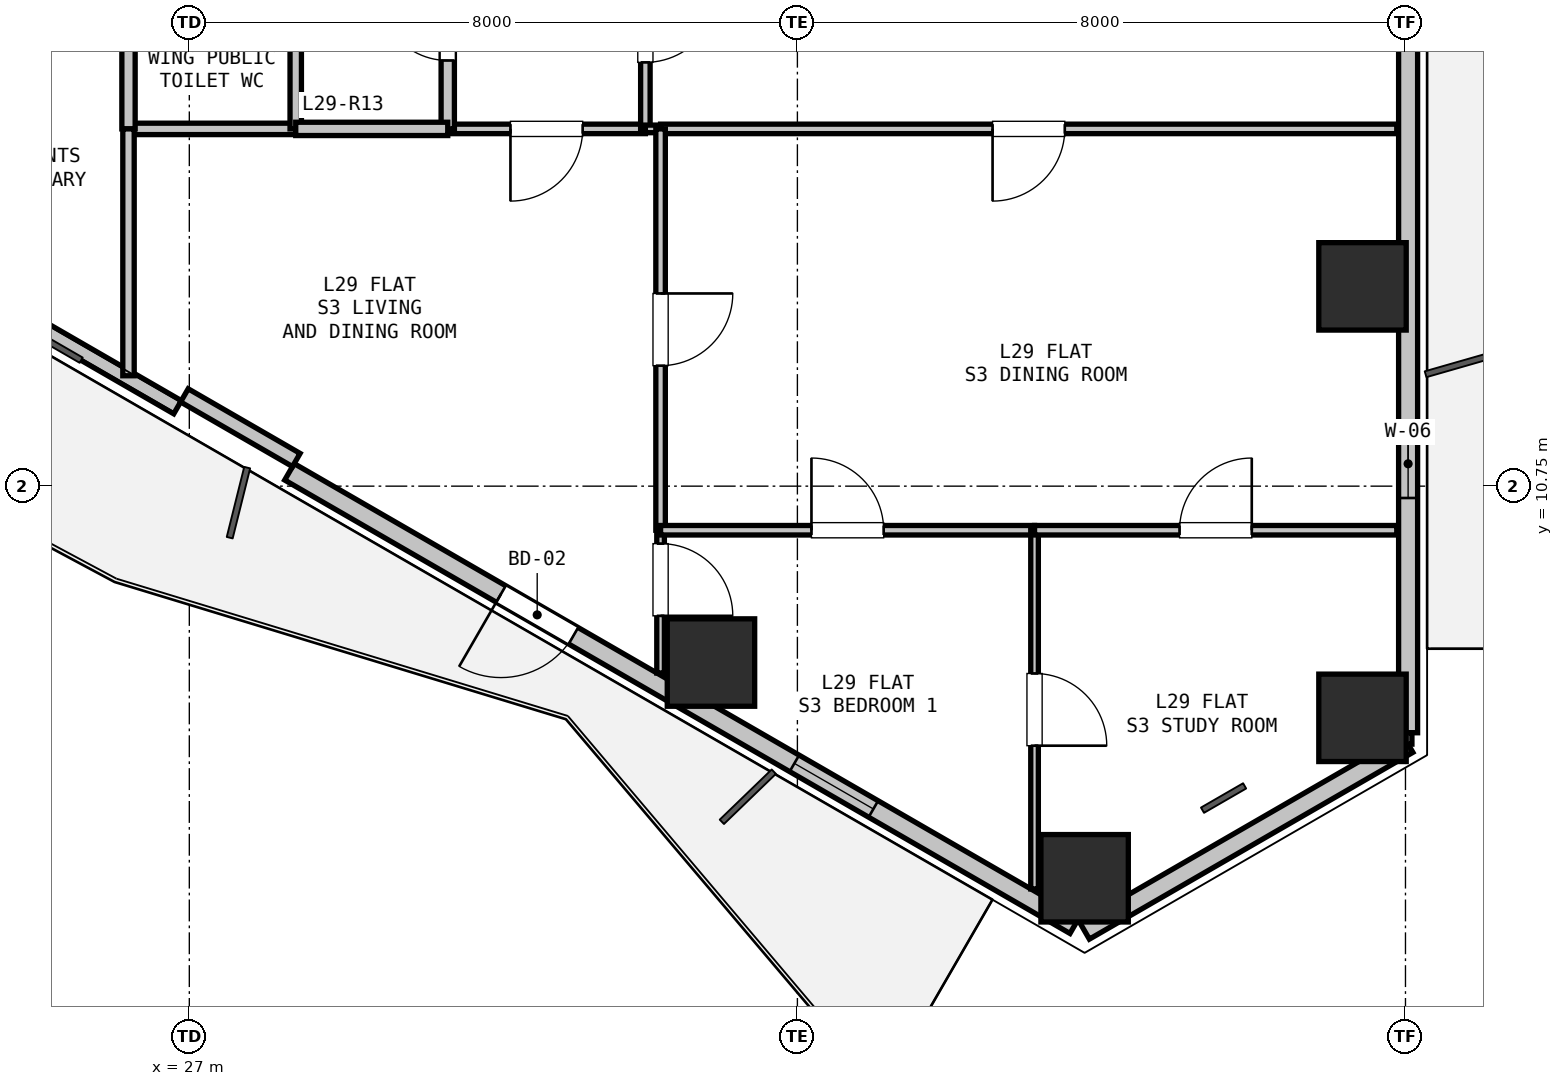
"""IFC4 building model, lengths in metres.
Left out: names, types, materials, properties, quantities, classifications, styles, units other than length and angle.
Written with IfcOpenShell. Run it as: python <this file> out.ifc"""

import sys

from ifc_helpers import new_model, si_unit, direction, frame, frame_2d, origin, origin_2d, place, context, subcontext, project, spatial, rectangle, hollow_rectangle, extrude, element, fill, save


model = new_model("IFC4")
c1 = context("Model", 3, precision=1e-05, world=origin(), true_north=direction((0.0, 1.0)))
c2 = subcontext(c1, "Body", "Model", "MODEL_VIEW")
j1 = project(units=[si_unit("LENGTHUNIT", "METRE"), si_unit("PLANEANGLEUNIT", "RADIAN")], contexts=[c1])
p1 = place(None, origin())
s1 = spatial("IfcSite", under=j1, at=p1, CompositionType="ELEMENT")
p2 = place(p1, origin())
s2 = spatial("IfcBuilding", under=s1, at=p2, CompositionType="ELEMENT")
p3 = place(p2, frame((0.0, 0.0, 106.5)))
s3 = spatial("IfcBuildingStorey", under=s2, at=p3, CompositionType="ELEMENT", Elevation=106.5)
for number, where, z_axis, x_axis in (
    (1, (42.435, 13.378, 0.0), (0.0, 0.0, 1.0), (1.0, 0.0, 0.0)),
    (2, (42.435, 7.702, 0.0), (0.0, 0.0, 1.0), (1.0, 0.0, 0.0)),
    (3, (38.779, 5.591, 0.0), (0.0, 0.0, 1.0), (1.0, 0.0, 0.0)),
    (4, (33.863, 8.429, 0.0), (0.0, 0.0, 1.0), (1.0, 0.0, 0.0)),
):
    element("IfcColumn", number, at=place(p3, frame(where, z_axis=z_axis, x_axis=x_axis)), inside=s3, PredefinedType="COLUMN", context=c2, shape_type="SweptSolid", body=[
        extrude(hollow_rectangle(XDim=1.15, YDim=1.15, WallThickness=0.032, at=origin_2d()), origin(), (0.0, 0.0, 1.0), 3.3),
    ])
p4 = place(p3, frame((43.035, 7.356, 0.0), z_axis=(0.0, 0.0, 1.0), x_axis=(-0.866011848704, -0.500023477353, 0.0)))
e5 = element("IfcWall", 5, at=p4, inside=s3, PredefinedType="SOLIDWALL", context=c2, shape_type="SweptSolid", body=[
    extrude(rectangle(XDim=4.914, YDim=0.25, at=frame_2d((2.457, 0.0))), origin(), (0.0, 0.0, 1.0), 2.67),
])
p5 = place(p3, frame((43.035, 19.435, 0.0), z_axis=(0.0, 0.0, 1.0), x_axis=(0.0, -1.0, 0.0)))
e6 = element("IfcWall", 6, at=p5, inside=s3, PredefinedType="SOLIDWALL", context=c2, shape_type="SweptSolid", body=[
    extrude(rectangle(XDim=11.93, YDim=0.25, at=frame_2d((5.965, 0.0))), origin(), (0.0, 0.0, 1.0), 2.67),
])
p6 = place(p5, frame((7.941, 0.0, 0.9)))
e7 = element("IfcOpeningElement", 7, at=p6, cuts=e6, PredefinedType="OPENING", context=c2, shape_type="SweptSolid", body=[
    extrude(rectangle(XDim=0.9, YDim=1.4, at=frame_2d((0.45, 0.7))), frame((0.0, 0.135, 0.0), z_axis=(0.0, -1.0, 0.0), x_axis=(1.0, 0.0, 0.0)), (0.0, 0.0, 1.0), 0.27),
])
p7 = place(p3, frame((38.649, 4.973, 0.0), z_axis=(0.0, 0.0, 1.0), x_axis=(-0.866023023012, 0.500004123596, 0.0)))
e8 = element("IfcWall", 8, at=p7, inside=s3, PredefinedType="SOLIDWALL", context=c2, shape_type="SweptSolid", body=[
    extrude(rectangle(XDim=11.93, YDim=0.25, at=frame_2d((5.965, 0.0))), origin(), (0.0, 0.0, 1.0), 2.67),
])
p8 = place(p7, frame((7.616, 0.0, 0.0)))
e9 = element("IfcOpeningElement", 9, at=p8, cuts=e8, PredefinedType="OPENING", context=c2, shape_type="SweptSolid", body=[
    extrude(rectangle(XDim=1.1, YDim=2.1, at=frame_2d((0.55, 1.05))), frame((0.0, 0.135, 0.0), z_axis=(0.0, -1.0, 0.0), x_axis=(1.0, 0.0, 0.0)), (0.0, 0.0, 1.0), 0.27),
])
p9 = place(p7, frame((3.059, 0.0, 0.9)))
e10 = element("IfcOpeningElement", 10, at=p9, cuts=e8, PredefinedType="OPENING", context=c2, shape_type="SweptSolid", body=[
    extrude(rectangle(XDim=1.2, YDim=1.4, at=frame_2d((0.6, 0.7))), frame((0.0, 0.135, 0.0), z_axis=(0.0, -1.0, 0.0), x_axis=(1.0, 0.0, 0.0)), (0.0, 0.0, 1.0), 0.27),
])
p10 = place(p3, frame((26.845, 11.788, 0.0), z_axis=(0.0, 0.0, 1.0), x_axis=(-0.866027010039, 0.499997217876, 0.0)))
e11 = element("IfcWall", 11, at=p10, inside=s3, PredefinedType="PARAPET", context=c2, shape_type="SweptSolid", body=[
    extrude(rectangle(XDim=11.229, YDim=0.2, at=frame_2d((5.615, 0.0))), origin(), (0.0, 0.0, 1.0), 0.2),
])
p11 = place(p3, frame((28.407, 11.094, 0.0), z_axis=(0.0, 0.0, 1.0), x_axis=(-0.86605165483, 0.499954529098, 0.0)))
e12 = element("IfcWall", 12, at=p11, inside=s3, PredefinedType="PARAPET", context=c2, shape_type="SweptSolid", body=[
    extrude(rectangle(XDim=1.7, YDim=0.2, at=frame_2d((0.85, 0.0))), origin(), (0.0, 0.0, 1.0), 2.67),
])
p12 = place(p3, frame((33.0, 15.45, 0.0), z_axis=(0.0, 0.0, 1.0), x_axis=(-1.0, 0.0, 0.0)))
e13 = element("IfcWall", 13, at=p12, inside=s3, PredefinedType="PARTITIONING", context=c2, shape_type="SweptSolid", body=[
    extrude(rectangle(XDim=2.6, YDim=0.125, at=frame_2d((1.3, 0.0))), origin(), (0.0, 0.0, 1.0), 3.05),
])
p13 = place(p12, frame((0.825, 0.0, 0.0)))
e14 = element("IfcOpeningElement", 14, at=p13, cuts=e13, PredefinedType="OPENING", context=c2, shape_type="SweptSolid", body=[
    extrude(rectangle(XDim=0.95, YDim=2.1, at=frame_2d((0.475, 1.05))), frame((0.0, 0.073, 0.0), z_axis=(0.0, -1.0, 0.0), x_axis=(1.0, 0.0, 0.0)), (0.0, 0.0, 1.0), 0.145),
])
p14 = place(p3, frame((30.4, 15.45, 0.0), z_axis=(0.0, 0.0, 1.0), x_axis=(0.0, 1.0, 0.0)))
e15 = element("IfcWall", 15, at=p14, inside=s3, PredefinedType="PLUMBINGWALL", context=c2, shape_type="SweptSolid", body=[
    extrude(rectangle(XDim=2.7, YDim=0.175, at=frame_2d((1.35, 0.0))), origin(), (0.0, 0.0, 1.0), 3.05),
])
p15 = place(p14, frame((0.9, 0.0, 0.0)))
e16 = element("IfcOpeningElement", 16, at=p15, cuts=e15, PredefinedType="OPENING", context=c2, shape_type="SweptSolid", body=[
    extrude(rectangle(XDim=0.9, YDim=2.1, at=frame_2d((0.45, 1.05))), frame((0.0, 0.097, 0.0), z_axis=(0.0, -1.0, 0.0), x_axis=(1.0, 0.0, 0.0)), (0.0, 0.0, 1.0), 0.195),
])
p16 = place(p3, frame((33.0, 18.15, 0.0), z_axis=(0.0, 0.0, 1.0), x_axis=(0.0, -1.0, 0.0)))
e17 = element("IfcWall", 17, at=p16, inside=s3, PredefinedType="PARTITIONING", context=c2, shape_type="SweptSolid", body=[
    extrude(rectangle(XDim=2.7, YDim=0.125, at=frame_2d((1.35, 0.0))), origin(), (0.0, 0.0, 1.0), 3.05),
])
p17 = place(p16, frame((0.875, 0.0, 0.0)))
e18 = element("IfcOpeningElement", 18, at=p17, cuts=e17, PredefinedType="OPENING", context=c2, shape_type="SweptSolid", body=[
    extrude(rectangle(XDim=0.95, YDim=2.1, at=frame_2d((0.475, 1.05))), frame((0.0, 0.073, 0.0), z_axis=(0.0, -1.0, 0.0), x_axis=(1.0, 0.0, 0.0)), (0.0, 0.0, 1.0), 0.145),
])
p18 = place(p3, frame((28.4, 15.45, 0.0), z_axis=(0.0, 0.0, 1.0), x_axis=(-1.0, 0.0, 0.0)))
e19 = element("IfcWall", 19, at=p18, inside=s3, PredefinedType="PARTITIONING", context=c2, shape_type="SweptSolid", body=[
    extrude(rectangle(XDim=2.2, YDim=0.15, at=frame_2d((1.1, 0.0))), origin(), (0.0, 0.0, 1.0), 2.423),
])
p19 = place(p3, frame((26.2, 15.45, 0.0), z_axis=(0.0, 0.0, 1.0), x_axis=(0.0, 1.0, 0.0)))
e20 = element("IfcWall", 20, at=p19, inside=s3, PredefinedType="PLUMBINGWALL", context=c2, shape_type="SweptSolid", body=[
    extrude(rectangle(XDim=2.7, YDim=0.175, at=frame_2d((1.35, 0.0))), origin(), (0.0, 0.0, 1.0), 2.423),
])
p20 = place(p3, frame((28.4, 18.15, 0.0), z_axis=(0.0, 0.0, 1.0), x_axis=(0.0, -1.0, 0.0)))
e21 = element("IfcWall", 21, at=p20, inside=s3, PredefinedType="PARTITIONING", context=c2, shape_type="SweptSolid", body=[
    extrude(rectangle(XDim=2.7, YDim=0.15, at=frame_2d((1.35, 0.0))), origin(), (0.0, 0.0, 1.0), 3.05),
])
p21 = place(p3, frame((30.4, 15.45, 0.0), z_axis=(0.0, 0.0, 1.0), x_axis=(-1.0, 0.0, 0.0)))
e22 = element("IfcWall", 22, at=p21, inside=s3, PredefinedType="PLUMBINGWALL", context=c2, shape_type="SweptSolid", body=[
    extrude(rectangle(XDim=2.0, YDim=0.175, at=frame_2d((1.0, 0.0))), origin(), (0.0, 0.0, 1.0), 3.05),
])
p22 = place(p3, frame((42.885, 15.45, 0.0), z_axis=(0.0, 0.0, 1.0), x_axis=(-1.0, 0.0, 0.0)))
e23 = element("IfcWall", 23, at=p22, inside=s3, PredefinedType="PARTITIONING", context=c2, shape_type="SweptSolid", body=[
    extrude(rectangle(XDim=9.686, YDim=0.125, at=frame_2d((4.843, 0.0))), origin(), (0.0, 0.0, 1.0), 2.365),
])
p23 = place(p22, frame((4.368, 0.0, 0.0)))
e24 = element("IfcOpeningElement", 24, at=p23, cuts=e23, PredefinedType="OPENING", context=c2, shape_type="SweptSolid", body=[
    extrude(rectangle(XDim=0.95, YDim=2.1, at=frame_2d((0.475, 1.05))), frame((0.0, 0.073, 0.0), z_axis=(0.0, -1.0, 0.0), x_axis=(1.0, 0.0, 0.0)), (0.0, 0.0, 1.0), 0.145),
])
p24 = place(p3, frame((33.2, 15.45, 0.0), z_axis=(0.0, 0.0, 1.0), x_axis=(-1.0, 0.0, 0.0)))
e25 = element("IfcWall", 25, at=p24, inside=s3, PredefinedType="PARTITIONING", context=c2, shape_type="SweptSolid", body=[
    extrude(rectangle(XDim=0.2, YDim=0.1, at=frame_2d((0.1, 0.0))), origin(), (0.0, 0.0, 1.0), 3.05),
])
p25 = place(p3, frame((26.2, 15.45, 0.0), z_axis=(0.0, 0.0, 1.0), x_axis=(0.0, -1.0, 0.0)))
e26 = element("IfcWall", 26, at=p25, inside=s3, PredefinedType="PARTITIONING", context=c2, shape_type="SweptSolid", body=[
    extrude(rectangle(XDim=3.248, YDim=0.15, at=frame_2d((1.624, 0.0))), origin(), (0.0, 0.0, 1.0), 2.365),
])
p26 = place(p3, frame((33.2, 15.45, 0.0), z_axis=(0.0, 0.0, 1.0), x_axis=(0.0, -1.0, 0.0)))
e27 = element("IfcWall", 27, at=p26, inside=s3, PredefinedType="PARTITIONING", context=c2, shape_type="SweptSolid", body=[
    extrude(rectangle(XDim=5.28, YDim=0.125, at=frame_2d((2.64, 0.0))), origin(), (0.0, 0.0, 1.0), 3.05),
])
p27 = place(p26, frame((2.165, 0.0, 0.0)))
e28 = element("IfcOpeningElement", 28, at=p27, cuts=e27, PredefinedType="OPENING", context=c2, shape_type="SweptSolid", body=[
    extrude(rectangle(XDim=0.95, YDim=2.1, at=frame_2d((0.475, 1.05))), frame((0.0, 0.073, 0.0), z_axis=(0.0, -1.0, 0.0), x_axis=(1.0, 0.0, 0.0)), (0.0, 0.0, 1.0), 0.145),
])
p28 = place(p3, frame((33.2, 10.17, 0.0), z_axis=(0.0, 0.0, 1.0), x_axis=(0.0, -1.0, 0.0)))
e29 = element("IfcWall", 29, at=p28, inside=s3, PredefinedType="PARTITIONING", context=c2, shape_type="SweptSolid", body=[
    extrude(rectangle(XDim=1.878, YDim=0.1, at=frame_2d((0.939, 0.0))), origin(), (0.0, 0.0, 1.0), 2.365),
])
p29 = place(p28, frame((0.176, 0.0, 0.0)))
e30 = element("IfcOpeningElement", 30, at=p29, cuts=e29, PredefinedType="OPENING", context=c2, shape_type="SweptSolid", body=[
    extrude(rectangle(XDim=0.95, YDim=2.1, at=frame_2d((0.475, 1.05))), frame((0.0, 0.06, 0.0), z_axis=(0.0, -1.0, 0.0), x_axis=(1.0, 0.0, 0.0)), (0.0, 0.0, 1.0), 0.12),
])
p30 = place(p3, frame((33.2, 10.17, 0.0), z_axis=(0.0, 0.0, 1.0), x_axis=(1.0, 0.0, 0.0)))
e31 = element("IfcWall", 31, at=p30, inside=s3, PredefinedType="PARTITIONING", context=c2, shape_type="SweptSolid", body=[
    extrude(rectangle(XDim=4.92, YDim=0.125, at=frame_2d((2.46, 0.0))), origin(), (0.0, 0.0, 1.0), 3.05),
])
p31 = place(p30, frame((1.985, 0.0, 0.0)))
e32 = element("IfcOpeningElement", 32, at=p31, cuts=e31, PredefinedType="OPENING", context=c2, shape_type="SweptSolid", body=[
    extrude(rectangle(XDim=0.95, YDim=2.1, at=frame_2d((0.475, 1.05))), frame((0.0, 0.073, 0.0), z_axis=(0.0, -1.0, 0.0), x_axis=(1.0, 0.0, 0.0)), (0.0, 0.0, 1.0), 0.145),
])
p32 = place(p3, frame((38.12, 10.17, 0.0), z_axis=(0.0, 0.0, 1.0), x_axis=(0.0, -1.0, 0.0)))
e33 = element("IfcWall", 33, at=p32, inside=s3, PredefinedType="PARTITIONING", context=c2, shape_type="SweptSolid", body=[
    extrude(rectangle(XDim=4.719, YDim=0.1, at=frame_2d((2.359, 0.0))), origin(), (0.0, 0.0, 1.0), 2.715),
])
p33 = place(p32, frame((1.885, 0.0, 0.0)))
e34 = element("IfcOpeningElement", 34, at=p33, cuts=e33, PredefinedType="OPENING", context=c2, shape_type="SweptSolid", body=[
    extrude(rectangle(XDim=0.95, YDim=2.1, at=frame_2d((0.475, 1.05))), frame((0.0, 0.06, 0.0), z_axis=(0.0, -1.0, 0.0), x_axis=(1.0, 0.0, 0.0)), (0.0, 0.0, 1.0), 0.12),
])
p34 = place(p3, frame((38.12, 10.17, 0.0), z_axis=(0.0, 0.0, 1.0), x_axis=(1.0, 0.0, 0.0)))
e35 = element("IfcWall", 35, at=p34, inside=s3, PredefinedType="PARTITIONING", context=c2, shape_type="SweptSolid", body=[
    extrude(rectangle(XDim=4.765, YDim=0.125, at=frame_2d((2.383, 0.0))), origin(), (0.0, 0.0, 1.0), 2.423),
])
p35 = place(p34, frame((1.908, 0.0, 0.0)))
e36 = element("IfcOpeningElement", 36, at=p35, cuts=e35, PredefinedType="OPENING", context=c2, shape_type="SweptSolid", body=[
    extrude(rectangle(XDim=0.95, YDim=2.1, at=frame_2d((0.475, 1.05))), frame((0.0, 0.073, 0.0), z_axis=(0.0, -1.0, 0.0), x_axis=(1.0, 0.0, 0.0)), (0.0, 0.0, 1.0), 0.145),
])
p36 = place(p3, frame((43.035, 7.506, 0.0), z_axis=(0.0, 0.0, 1.0), x_axis=(0.0, -1.0, 0.0)))
e37 = element("IfcWall", 37, at=p36, inside=s3, PredefinedType="PARTITIONING", context=c2, shape_type="SweptSolid", body=[
    extrude(rectangle(XDim=0.15, YDim=0.1, at=frame_2d((0.075, 0.0))), origin(), (0.0, 0.0, 1.0), 3.05),
])
p37 = place(p6, origin())
e38 = element("IfcWindow", 38, at=p37, inside=s3, PartitioningType="SINGLE_PANEL", PredefinedType="WINDOW", context=c2, shape_type="SweptSolid", body=[
    extrude(rectangle(XDim=0.9, YDim=1.4, at=frame_2d((0.45, 0.7))), frame((0.0, 0.03, 0.0), z_axis=(0.0, -1.0, 0.0), x_axis=(1.0, 0.0, 0.0)), (0.0, 0.0, 1.0), 0.06),
])
fill(e7, e38)
p38 = place(p8, origin())
e39 = element("IfcDoor", 39, at=p38, inside=s3, OperationType="SINGLE_SWING_RIGHT", PredefinedType="DOOR", context=c2, shape_type="SweptSolid", body=[
    extrude(rectangle(XDim=1.1, YDim=2.1, at=frame_2d((0.55, 1.05))), frame((0.0, 0.025, 0.0), z_axis=(0.0, -1.0, 0.0), x_axis=(1.0, 0.0, 0.0)), (0.0, 0.0, 1.0), 0.05),
])
fill(e9, e39)
p39 = place(p9, origin())
e40 = element("IfcWindow", 40, at=p39, inside=s3, PartitioningType="SINGLE_PANEL", PredefinedType="WINDOW", context=c2, shape_type="SweptSolid", body=[
    extrude(rectangle(XDim=1.2, YDim=1.4, at=frame_2d((0.6, 0.7))), frame((0.0, 0.03, 0.0), z_axis=(0.0, -1.0, 0.0), x_axis=(1.0, 0.0, 0.0)), (0.0, 0.0, 1.0), 0.06),
])
fill(e10, e40)
p40 = place(p15, origin())
e41 = element("IfcDoor", 41, at=p40, inside=s3, OperationType="SINGLE_SWING_RIGHT", PredefinedType="DOOR", context=c2, shape_type="SweptSolid", body=[
    extrude(rectangle(XDim=0.9, YDim=2.1, at=frame_2d((0.45, 1.05))), frame((0.0, 0.025, 0.0), z_axis=(0.0, -1.0, 0.0), x_axis=(1.0, 0.0, 0.0)), (0.0, 0.0, 1.0), 0.05),
])
fill(e16, e41)
p41 = place(p17, origin())
e42 = element("IfcDoor", 42, at=p41, inside=s3, OperationType="SINGLE_SWING_LEFT", PredefinedType="DOOR", context=c2, shape_type="SweptSolid", body=[
    extrude(rectangle(XDim=0.95, YDim=2.1, at=frame_2d((0.475, 1.05))), frame((0.0, 0.025, 0.0), z_axis=(0.0, -1.0, 0.0), x_axis=(1.0, 0.0, 0.0)), (0.0, 0.0, 1.0), 0.05),
])
fill(e18, e42)
p42 = place(p13, origin())
e43 = element("IfcDoor", 43, at=p42, inside=s3, OperationType="SINGLE_SWING_RIGHT", PredefinedType="DOOR", context=c2, shape_type="SweptSolid", body=[
    extrude(rectangle(XDim=0.95, YDim=2.1, at=frame_2d((0.475, 1.05))), frame((0.0, 0.025, 0.0), z_axis=(0.0, -1.0, 0.0), x_axis=(1.0, 0.0, 0.0)), (0.0, 0.0, 1.0), 0.05),
])
fill(e14, e43)
p43 = place(p23, origin())
e44 = element("IfcDoor", 44, at=p43, inside=s3, OperationType="SINGLE_SWING_RIGHT", PredefinedType="DOOR", context=c2, shape_type="SweptSolid", body=[
    extrude(rectangle(XDim=0.95, YDim=2.1, at=frame_2d((0.475, 1.05))), frame((0.0, 0.025, 0.0), z_axis=(0.0, -1.0, 0.0), x_axis=(1.0, 0.0, 0.0)), (0.0, 0.0, 1.0), 0.05),
])
fill(e24, e44)
p44 = place(p29, origin())
e45 = element("IfcDoor", 45, at=p44, inside=s3, OperationType="SINGLE_SWING_RIGHT", PredefinedType="DOOR", context=c2, shape_type="SweptSolid", body=[
    extrude(rectangle(XDim=0.95, YDim=2.1, at=frame_2d((0.475, 1.05))), frame((0.0, 0.025, 0.0), z_axis=(0.0, -1.0, 0.0), x_axis=(1.0, 0.0, 0.0)), (0.0, 0.0, 1.0), 0.05),
])
fill(e30, e45)
p45 = place(p27, origin())
e46 = element("IfcDoor", 46, at=p45, inside=s3, OperationType="SINGLE_SWING_LEFT", PredefinedType="DOOR", context=c2, shape_type="SweptSolid", body=[
    extrude(rectangle(XDim=0.95, YDim=2.1, at=frame_2d((0.475, 1.05))), frame((0.0, 0.025, 0.0), z_axis=(0.0, -1.0, 0.0), x_axis=(1.0, 0.0, 0.0)), (0.0, 0.0, 1.0), 0.05),
])
fill(e28, e46)
p46 = place(p33, origin())
e47 = element("IfcDoor", 47, at=p46, inside=s3, OperationType="SINGLE_SWING_RIGHT", PredefinedType="DOOR", context=c2, shape_type="SweptSolid", body=[
    extrude(rectangle(XDim=0.95, YDim=2.1, at=frame_2d((0.475, 1.05))), frame((0.0, 0.025, 0.0), z_axis=(0.0, -1.0, 0.0), x_axis=(1.0, 0.0, 0.0)), (0.0, 0.0, 1.0), 0.05),
])
fill(e34, e47)
p47 = place(p31, origin())
e48 = element("IfcDoor", 48, at=p47, inside=s3, OperationType="SINGLE_SWING_LEFT", PredefinedType="DOOR", context=c2, shape_type="SweptSolid", body=[
    extrude(rectangle(XDim=0.95, YDim=2.1, at=frame_2d((0.475, 1.05))), frame((0.0, 0.025, 0.0), z_axis=(0.0, -1.0, 0.0), x_axis=(1.0, 0.0, 0.0)), (0.0, 0.0, 1.0), 0.05),
])
fill(e32, e48)
p48 = place(p35, origin())
e49 = element("IfcDoor", 49, at=p48, inside=s3, OperationType="SINGLE_SWING_RIGHT", PredefinedType="DOOR", context=c2, shape_type="SweptSolid", body=[
    extrude(rectangle(XDim=0.95, YDim=2.1, at=frame_2d((0.475, 1.05))), frame((0.0, 0.025, 0.0), z_axis=(0.0, -1.0, 0.0), x_axis=(1.0, 0.0, 0.0)), (0.0, 0.0, 1.0), 0.05),
])
fill(e36, e49)
save(model, sys.argv[1])
